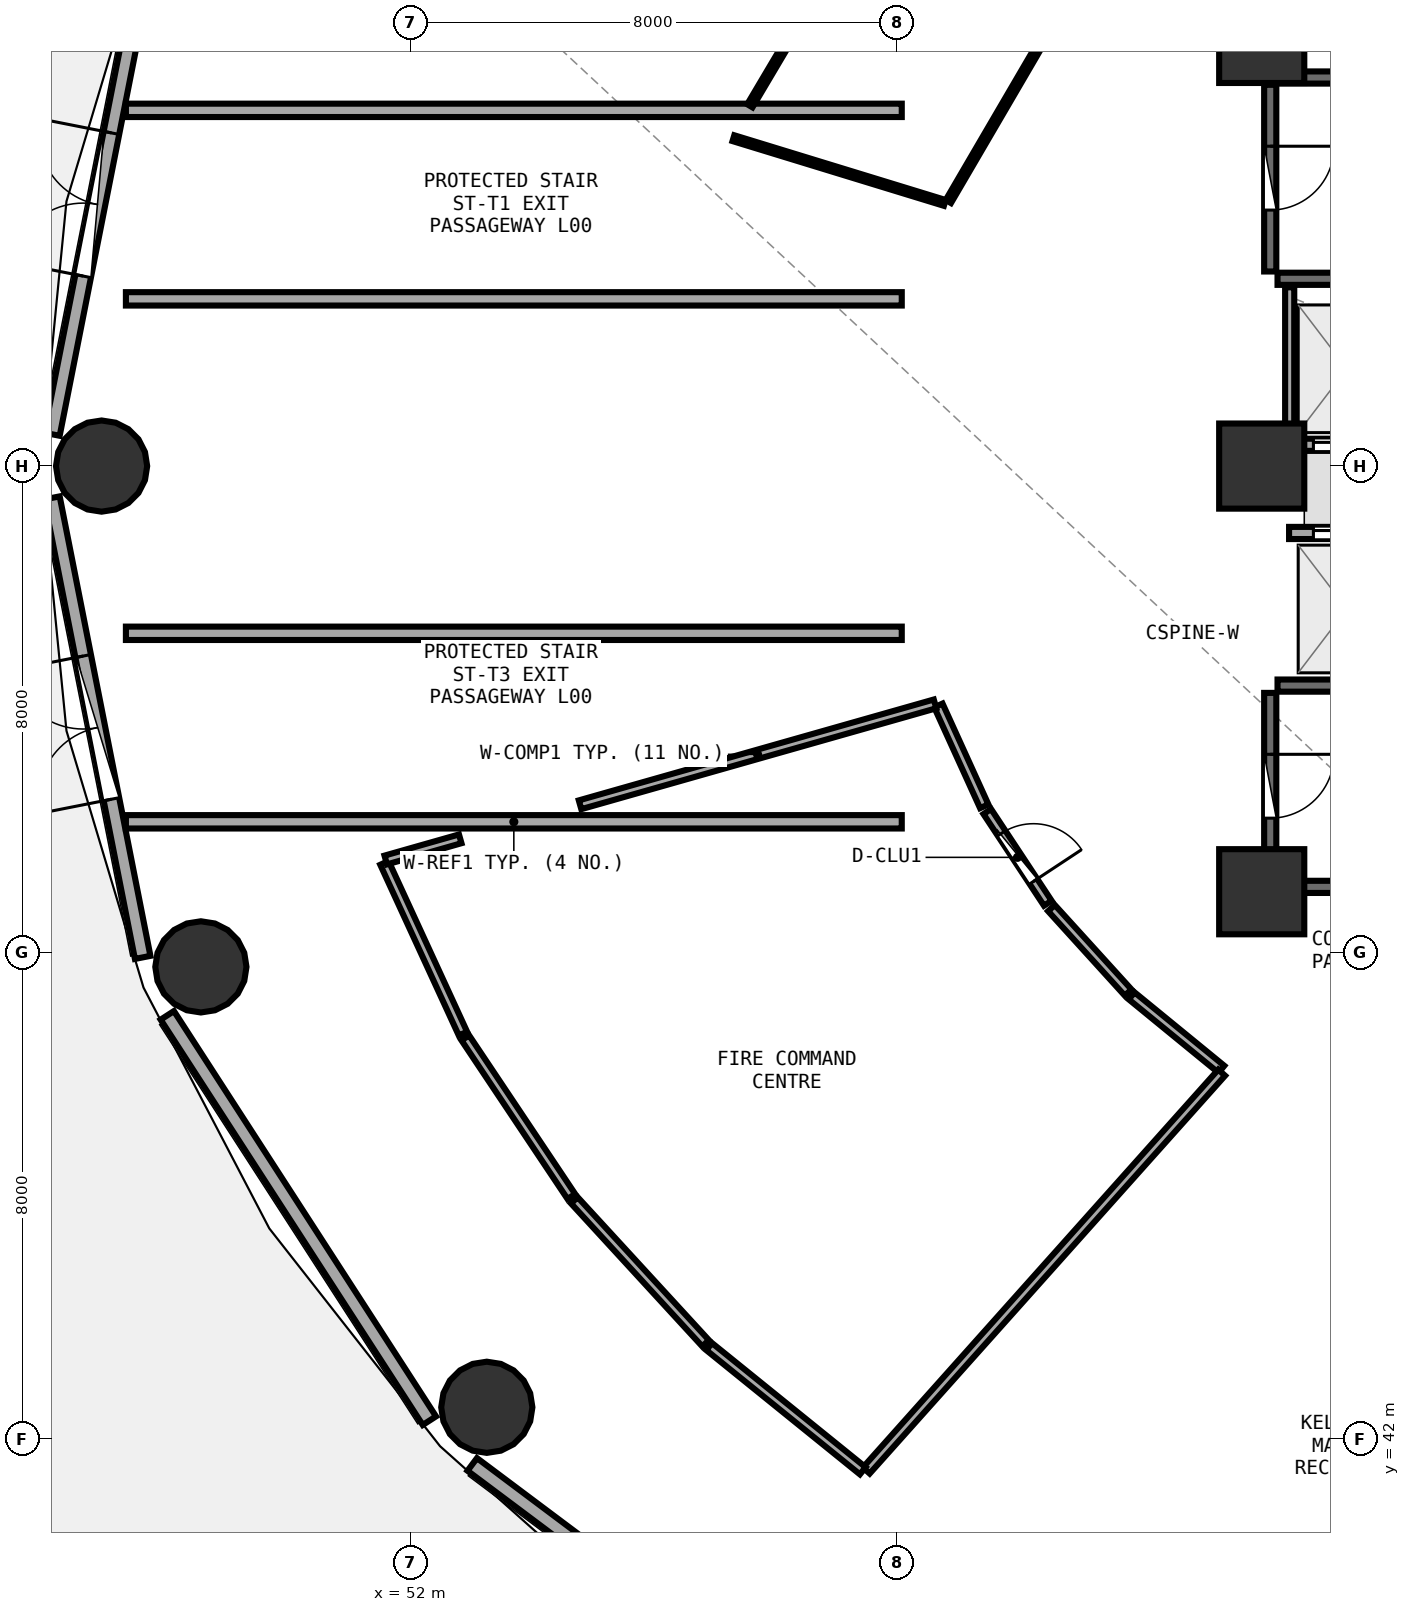
"""IFC4 building model, lengths in metres.
Left out: names, types, materials, properties, quantities, classifications, styles, units other than length and angle.
Written with IfcOpenShell. Run it as: python <this file> out.ifc"""

import sys

from ifc_helpers import new_model, si_unit, direction, frame, frame_2d, origin, origin_2d, place, context, subcontext, project, spatial, rectangle, circle, extrude, element, fill, save


model = new_model("IFC4")
c1 = context("Model", 3, precision=1e-05, world=origin(), true_north=direction((0.0, 1.0)))
c2 = subcontext(c1, "Body", "Model", "MODEL_VIEW")
j1 = project(units=[si_unit("LENGTHUNIT", "METRE"), si_unit("PLANEANGLEUNIT", "RADIAN")], contexts=[c1])
p1 = place(None, origin())
s1 = spatial("IfcSite", under=j1, at=p1, CompositionType="ELEMENT")
p2 = place(p1, origin())
s2 = spatial("IfcBuilding", under=s1, at=p2, CompositionType="ELEMENT")
p3 = place(p2, origin())
s3 = spatial("IfcBuildingStorey", under=s2, at=p3, CompositionType="ELEMENT", Elevation=0.0)
for number, where, z_axis, x_axis in (
    (1, (66.0, 51.0, 0.0), (0.0, 0.0, 1.0), (1.0, 0.0, 0.0)),
    (2, (66.0, 65.0, 0.0), (0.0, 0.0, 1.0), (1.0, 0.0, 0.0)),
    (3, (66.0, 58.0, 0.0), (0.0, 0.0, 1.0), (1.0, 0.0, 0.0)),
):
    element("IfcColumn", number, at=place(p3, frame(where, z_axis=z_axis, x_axis=x_axis)), inside=s3, PredefinedType="PILASTER", context=c2, shape_type="SweptSolid", body=[
        extrude(rectangle(XDim=1.4, YDim=1.4, at=origin_2d()), origin(), (0.0, 0.0, 1.0), 4.5),
    ])
for number, where, z_axis, x_axis in (
    (4, (46.92, 58.0, 0.0), (0.0, 0.0, 1.0), (1.0, 0.0, 0.0)),
    (5, (48.553, 49.764, 0.0), (0.0, 0.0, 1.0), (1.0, 0.0, 0.0)),
    (6, (53.256, 42.522, 0.0), (0.0, 0.0, 1.0), (1.0, 0.0, 0.0)),
):
    element("IfcColumn", number, at=place(p3, frame(where, z_axis=z_axis, x_axis=x_axis)), inside=s3, PredefinedType="COLUMN", context=c2, shape_type="SweptSolid", body=[
        extrude(circle(Radius=0.75, at=origin_2d()), origin(), (0.0, 0.0, 1.0), 4.5),
    ])
p4 = place(p3, frame((47.596, 66.08, 0.0), z_axis=(0.0, 0.0, 1.0), x_axis=(-0.193726159581, -0.98105564322, 0.0)))
e7 = element("IfcWall", 7, at=p4, inside=s3, PredefinedType="SOLIDWALL", context=c2, shape_type="SweptSolid", body=[
    extrude(rectangle(XDim=7.703, YDim=0.26, at=frame_2d((3.851, 0.0))), origin(), (0.0, 0.0, 1.0), 4.185),
])
p5 = place(p4, frame((2.651, 0.0, 0.0)))
e8 = element("IfcOpeningElement", 8, at=p5, cuts=e7, PredefinedType="OPENING", context=c2, shape_type="SweptSolid", body=[
    extrude(rectangle(XDim=2.4, YDim=2.35, at=frame_2d((1.2, 1.175))), frame((0.0, 0.14, 0.0), z_axis=(0.0, -1.0, 0.0), x_axis=(1.0, 0.0, 0.0)), (0.0, 0.0, 1.0), 0.28),
])
p6 = place(p3, frame((46.104, 57.477, 0.0), z_axis=(0.0, 0.0, 1.0), x_axis=(0.193726159581, -0.98105564322, 0.0)))
e9 = element("IfcWall", 9, at=p6, inside=s3, PredefinedType="SOLIDWALL", context=c2, shape_type="SweptSolid", body=[
    extrude(rectangle(XDim=7.703, YDim=0.26, at=frame_2d((3.851, 0.0))), origin(), (0.0, 0.0, 1.0), 4.185),
])
p7 = place(p6, frame((2.651, 0.0, 0.0)))
e10 = element("IfcOpeningElement", 10, at=p7, cuts=e9, PredefinedType="OPENING", context=c2, shape_type="SweptSolid", body=[
    extrude(rectangle(XDim=2.4, YDim=2.35, at=frame_2d((1.2, 1.175))), frame((0.0, 0.14, 0.0), z_axis=(0.0, -1.0, 0.0), x_axis=(1.0, 0.0, 0.0)), (0.0, 0.0, 1.0), 0.28),
])
p8 = place(p3, frame((48.001, 48.967, 0.0), z_axis=(0.0, 0.0, 1.0), x_axis=(0.543005114258, -0.839729388488, 0.0)))
e11 = element("IfcWall", 11, at=p8, inside=s3, PredefinedType="SOLIDWALL", context=c2, shape_type="SweptSolid", body=[
    extrude(rectangle(XDim=7.938, YDim=0.26, at=frame_2d((3.969, 0.0))), origin(), (0.0, 0.0, 1.0), 4.185),
])
p9 = place(p3, frame((53.016, 41.582, 0.0), z_axis=(0.0, 0.0, 1.0), x_axis=(0.80030733173, -0.599590005569, 0.0)))
e12 = element("IfcWall", 12, at=p9, inside=s3, PredefinedType="SOLIDWALL", context=c2, shape_type="SweptSolid", body=[
    extrude(rectangle(XDim=8.291, YDim=0.26, at=frame_2d((4.145, 0.0))), origin(), (0.0, 0.0, 1.0), 4.185),
])
p10 = place(p9, frame((2.945, 0.0, 0.0)))
e13 = element("IfcOpeningElement", 13, at=p10, cuts=e12, PredefinedType="OPENING", context=c2, shape_type="SweptSolid", body=[
    extrude(rectangle(XDim=2.4, YDim=2.35, at=frame_2d((1.2, 1.175))), frame((0.0, 0.14, 0.0), z_axis=(0.0, -1.0, 0.0), x_axis=(1.0, 0.0, 0.0)), (0.0, 0.0, 1.0), 0.28),
])
for number, where, z_axis, x_axis in (
    (14, (66.26, 61.08, 0.0), (0.0, 0.0, 1.0), (1.0, 0.0, 0.0)),
    (15, (73.42, 64.39, 0.0), (0.0, 0.0, 1.0), (-1.0, 0.0, 0.0)),
):
    element("IfcWall", number, at=place(p3, frame(where, z_axis=z_axis, x_axis=x_axis)), inside=s3, PredefinedType="SHEAR", context=c2, shape_type="SweptSolid", body=[
        extrude(rectangle(XDim=7.16, YDim=0.2, at=frame_2d((3.58, 0.0))), origin(), (0.0, 0.0, 1.0), 4.2),
    ])
p11 = place(p3, frame((66.14, 64.27, 0.0), z_axis=(0.0, 0.0, 1.0), x_axis=(0.0, -1.0, 0.0)))
e16 = element("IfcWall", 16, at=p11, inside=s3, PredefinedType="SHEAR", context=c2, shape_type="SweptSolid", body=[
    extrude(rectangle(XDim=3.07, YDim=0.2, at=frame_2d((1.535, 0.0))), origin(), (0.0, 0.0, 1.0), 4.2),
])
p12 = place(p11, frame((1.01, 0.0, 0.0)))
e17 = element("IfcOpeningElement", 17, at=p12, cuts=e16, PredefinedType="OPENING", context=c2, shape_type="SweptSolid", body=[
    extrude(rectangle(XDim=1.05, YDim=2.1, at=frame_2d((0.525, 1.05))), frame((0.0, 0.11, 0.0), z_axis=(0.0, -1.0, 0.0), x_axis=(1.0, 0.0, 0.0)), (0.0, 0.0, 1.0), 0.22),
])
for number, where, z_axis, x_axis in (
    (18, (66.26, 51.08, 0.0), (0.0, 0.0, 1.0), (1.0, 0.0, 0.0)),
    (19, (73.42, 54.39, 0.0), (0.0, 0.0, 1.0), (-1.0, 0.0, 0.0)),
):
    element("IfcWall", number, at=place(p3, frame(where, z_axis=z_axis, x_axis=x_axis)), inside=s3, PredefinedType="SHEAR", context=c2, shape_type="SweptSolid", body=[
        extrude(rectangle(XDim=7.16, YDim=0.2, at=frame_2d((3.58, 0.0))), origin(), (0.0, 0.0, 1.0), 4.2),
    ])
p13 = place(p3, frame((66.14, 54.27, 0.0), z_axis=(0.0, 0.0, 1.0), x_axis=(0.0, -1.0, 0.0)))
e20 = element("IfcWall", 20, at=p13, inside=s3, PredefinedType="SHEAR", context=c2, shape_type="SweptSolid", body=[
    extrude(rectangle(XDim=3.07, YDim=0.2, at=frame_2d((1.535, 0.0))), origin(), (0.0, 0.0, 1.0), 4.2),
])
p14 = place(p13, frame((1.01, 0.0, 0.0)))
e21 = element("IfcOpeningElement", 21, at=p14, cuts=e20, PredefinedType="OPENING", context=c2, shape_type="SweptSolid", body=[
    extrude(rectangle(XDim=1.05, YDim=2.1, at=frame_2d((0.525, 1.05))), frame((0.0, 0.11, 0.0), z_axis=(0.0, -1.0, 0.0), x_axis=(1.0, 0.0, 0.0)), (0.0, 0.0, 1.0), 0.22),
])
for number, where, z_axis, x_axis in (
    (22, (47.32, 63.85, 0.0), (0.0, 0.0, 1.0), (1.0, 0.0, 0.0)),
    (23, (47.32, 60.75, 0.0), (0.0, 0.0, 1.0), (1.0, 0.0, 0.0)),
    (24, (47.32, 55.25, 0.0), (0.0, 0.0, 1.0), (1.0, 0.0, 0.0)),
    (25, (47.32, 52.15, 0.0), (0.0, 0.0, 1.0), (1.0, 0.0, 0.0)),
):
    element("IfcWall", number, at=place(p3, frame(where, z_axis=z_axis, x_axis=x_axis)), inside=s3, PredefinedType="SOLIDWALL", context=c2, shape_type="SweptSolid", body=[
        extrude(rectangle(XDim=12.76, YDim=0.22, at=frame_2d((6.38, 0.0))), origin(), (0.0, 0.0, 1.0), 3.585),
    ])
p15 = place(p3, frame((66.45, 58.35, 0.0), z_axis=(0.0, 0.0, 1.0), x_axis=(1.0, 0.0, 0.0)))
e26 = element("IfcWall", 26, at=p15, inside=s3, PredefinedType="SOLIDWALL", context=c2, shape_type="SweptSolid", body=[
    extrude(rectangle(XDim=6.0, YDim=0.2, at=frame_2d((3.0, 0.0))), origin(), (0.0, 0.0, 1.0), 4.19),
])
p16 = place(p15, frame((0.4, 0.0, 0.0)))
e27 = element("IfcOpeningElement", 27, at=p16, cuts=e26, PredefinedType="OPENING", context=c2, shape_type="SweptSolid", body=[
    extrude(rectangle(XDim=1.1, YDim=2.1, at=frame_2d((0.55, 1.05))), frame((0.0, 0.11, 0.0), z_axis=(0.0, -1.0, 0.0), x_axis=(1.0, 0.0, 0.0)), (0.0, 0.0, 1.0), 0.22),
])
p17 = place(p15, frame((2.4, 0.0, 0.0)))
e28 = element("IfcOpeningElement", 28, at=p17, cuts=e26, PredefinedType="OPENING", context=c2, shape_type="SweptSolid", body=[
    extrude(rectangle(XDim=1.1, YDim=2.1, at=frame_2d((0.55, 1.05))), frame((0.0, 0.11, 0.0), z_axis=(0.0, -1.0, 0.0), x_axis=(1.0, 0.0, 0.0)), (0.0, 0.0, 1.0), 0.22),
])
p18 = place(p15, frame((4.4, 0.0, 0.0)))
e29 = element("IfcOpeningElement", 29, at=p18, cuts=e26, PredefinedType="OPENING", context=c2, shape_type="SweptSolid", body=[
    extrude(rectangle(XDim=1.1, YDim=2.1, at=frame_2d((0.55, 1.05))), frame((0.0, 0.11, 0.0), z_axis=(0.0, -1.0, 0.0), x_axis=(1.0, 0.0, 0.0)), (0.0, 0.0, 1.0), 0.22),
])
p19 = place(p3, frame((66.46, 58.48, 0.0), z_axis=(0.0, 0.0, 1.0), x_axis=(0.0, 1.0, 0.0)))
e30 = element("IfcWall", 30, at=p19, inside=s3, PredefinedType="PARTITIONING", context=c2, shape_type="SweptSolid", body=[
    extrude(rectangle(XDim=2.46, YDim=0.15, at=frame_2d((1.23, 0.0))), origin(), (0.0, 0.0, 1.0), 4.19),
])
p20 = place(p3, frame((66.45, 56.9, 0.0), z_axis=(0.0, 0.0, 1.0), x_axis=(1.0, 0.0, 0.0)))
e31 = element("IfcWall", 31, at=p20, inside=s3, PredefinedType="SOLIDWALL", context=c2, shape_type="SweptSolid", body=[
    extrude(rectangle(XDim=14.4, YDim=0.2, at=frame_2d((7.2, 0.0))), origin(), (0.0, 0.0, 1.0), 4.19),
])
p21 = place(p20, frame((0.4, 0.0, 0.0)))
e32 = element("IfcOpeningElement", 32, at=p21, cuts=e31, PredefinedType="OPENING", context=c2, shape_type="SweptSolid", body=[
    extrude(rectangle(XDim=1.1, YDim=2.1, at=frame_2d((0.55, 1.05))), frame((0.0, 0.11, 0.0), z_axis=(0.0, -1.0, 0.0), x_axis=(1.0, 0.0, 0.0)), (0.0, 0.0, 1.0), 0.22),
])
p22 = place(p20, frame((2.4, 0.0, 0.0)))
e33 = element("IfcOpeningElement", 33, at=p22, cuts=e31, PredefinedType="OPENING", context=c2, shape_type="SweptSolid", body=[
    extrude(rectangle(XDim=1.1, YDim=2.1, at=frame_2d((0.55, 1.05))), frame((0.0, 0.11, 0.0), z_axis=(0.0, -1.0, 0.0), x_axis=(1.0, 0.0, 0.0)), (0.0, 0.0, 1.0), 0.22),
])
p23 = place(p20, frame((4.4, 0.0, 0.0)))
e34 = element("IfcOpeningElement", 34, at=p23, cuts=e31, PredefinedType="OPENING", context=c2, shape_type="SweptSolid", body=[
    extrude(rectangle(XDim=1.1, YDim=2.1, at=frame_2d((0.55, 1.05))), frame((0.0, 0.11, 0.0), z_axis=(0.0, -1.0, 0.0), x_axis=(1.0, 0.0, 0.0)), (0.0, 0.0, 1.0), 0.22),
])
p24 = place(p20, frame((6.4, 0.0, 0.0)))
e35 = element("IfcOpeningElement", 35, at=p24, cuts=e31, PredefinedType="OPENING", context=c2, shape_type="SweptSolid", body=[
    extrude(rectangle(XDim=1.1, YDim=2.1, at=frame_2d((0.55, 1.05))), frame((0.0, 0.11, 0.0), z_axis=(0.0, -1.0, 0.0), x_axis=(1.0, 0.0, 0.0)), (0.0, 0.0, 1.0), 0.22),
])
p25 = place(p20, frame((8.4, 0.0, 0.0)))
e36 = element("IfcOpeningElement", 36, at=p25, cuts=e31, PredefinedType="OPENING", context=c2, shape_type="SweptSolid", body=[
    extrude(rectangle(XDim=1.1, YDim=2.1, at=frame_2d((0.55, 1.05))), frame((0.0, 0.11, 0.0), z_axis=(0.0, -1.0, 0.0), x_axis=(1.0, 0.0, 0.0)), (0.0, 0.0, 1.0), 0.22),
])
p26 = place(p20, frame((10.6, 0.0, 0.0)))
e37 = element("IfcOpeningElement", 37, at=p26, cuts=e31, PredefinedType="OPENING", context=c2, shape_type="SweptSolid", body=[
    extrude(rectangle(XDim=1.1, YDim=2.1, at=frame_2d((0.55, 1.05))), frame((0.0, 0.11, 0.0), z_axis=(0.0, -1.0, 0.0), x_axis=(1.0, 0.0, 0.0)), (0.0, 0.0, 1.0), 0.22),
])
p27 = place(p20, frame((12.8, 0.0, 0.0)))
e38 = element("IfcOpeningElement", 38, at=p27, cuts=e31, PredefinedType="OPENING", context=c2, shape_type="SweptSolid", body=[
    extrude(rectangle(XDim=1.1, YDim=2.1, at=frame_2d((0.55, 1.05))), frame((0.0, 0.11, 0.0), z_axis=(0.0, -1.0, 0.0), x_axis=(1.0, 0.0, 0.0)), (0.0, 0.0, 1.0), 0.22),
])
p28 = place(p3, frame((61.486, 52.319, 0.0), z_axis=(0.0, 0.0, 1.0), x_axis=(0.551109461678, -0.834432957912, 0.0)))
e39 = element("IfcWall", 39, at=p28, inside=s3, PredefinedType="PARTITIONING", context=c2, shape_type="SweptSolid", body=[
    extrude(rectangle(XDim=1.807, YDim=0.15, at=frame_2d((0.903, 0.0))), origin(), (0.0, 0.0, 1.0), 3.585),
])
p29 = place(p28, frame((0.428, 0.0, 0.0)))
e40 = element("IfcOpeningElement", 40, at=p29, cuts=e39, PredefinedType="OPENING", context=c2, shape_type="SweptSolid", body=[
    extrude(rectangle(XDim=0.95, YDim=2.08, at=frame_2d((0.475, 1.04))), frame((0.0, 0.085, 0.0), z_axis=(0.0, -1.0, 0.0), x_axis=(1.0, 0.0, 0.0)), (0.0, 0.0, 1.0), 0.17),
])
p30 = place(p3, frame((62.566, 65.293, 0.0), z_axis=(0.0, 0.0, 1.0), x_axis=(-0.504538896435, -0.863388963321, 0.0)))
e41 = element("IfcWall", 41, at=p30, inside=s3, PredefinedType="PARTITIONING", context=c2, shape_type="SweptSolid", body=[
    extrude(rectangle(XDim=3.408, YDim=0.1, at=frame_2d((1.704, 0.0))), origin(), (0.0, 0.0, 1.0), 3.585),
])
p31 = place(p3, frame((60.788, 62.328, 0.0), z_axis=(0.0, 0.0, 1.0), x_axis=(-0.95616581323, 0.292825780302, 0.0)))
e42 = element("IfcWall", 42, at=p31, inside=s3, PredefinedType="PARTITIONING", context=c2, shape_type="SweptSolid", body=[
    extrude(rectangle(XDim=3.636, YDim=0.1, at=frame_2d((1.818, 0.0))), origin(), (0.0, 0.0, 1.0), 3.945),
])
p32 = place(p3, frame((57.582, 63.925, 0.0), z_axis=(0.0, 0.0, 1.0), x_axis=(0.510042246843, 0.860149351238, 0.0)))
e43 = element("IfcWall", 43, at=p32, inside=s3, PredefinedType="PARTITIONING", context=c2, shape_type="SweptSolid", body=[
    extrude(rectangle(XDim=3.738, YDim=0.1, at=frame_2d((1.869, 0.0))), origin(), (0.0, 0.0, 1.0), 3.585),
])
p33 = place(p3, frame((60.683, 54.064, 0.0), z_axis=(0.0, 0.0, 1.0), x_axis=(0.413772648006, -0.910380247897, 0.0)))
e44 = element("IfcWall", 44, at=p33, inside=s3, PredefinedType="PARTITIONING", context=c2, shape_type="SweptSolid", body=[
    extrude(rectangle(XDim=1.822, YDim=0.15, at=frame_2d((0.911, 0.0))), origin(), (0.0, 0.0, 1.0), 4.19),
])
p34 = place(p3, frame((62.542, 50.731, 0.0), z_axis=(0.0, 0.0, 1.0), x_axis=(0.672186822345, -0.740381574505, 0.0)))
e45 = element("IfcWall", 45, at=p34, inside=s3, PredefinedType="PARTITIONING", context=c2, shape_type="SweptSolid", body=[
    extrude(rectangle(XDim=1.876, YDim=0.15, at=frame_2d((0.938, 0.0))), origin(), (0.0, 0.0, 1.0), 3.585),
])
p35 = place(p3, frame((63.861, 49.288, 0.0), z_axis=(0.0, 0.0, 1.0), x_axis=(0.774014344512, -0.633168061805, 0.0)))
e46 = element("IfcWall", 46, at=p35, inside=s3, PredefinedType="PARTITIONING", context=c2, shape_type="SweptSolid", body=[
    extrude(rectangle(XDim=1.907, YDim=0.15, at=frame_2d((0.953, 0.0))), origin(), (0.0, 0.0, 1.0), 3.585),
])
p36 = place(p3, frame((65.341, 48.025, 0.0), z_axis=(0.0, 0.0, 1.0), x_axis=(-0.666165058958, -0.745804340443, 0.0)))
e47 = element("IfcWall", 47, at=p36, inside=s3, PredefinedType="PARTITIONING", context=c2, shape_type="SweptSolid", body=[
    extrude(rectangle(XDim=8.774, YDim=0.15, at=frame_2d((4.387, 0.0))), origin(), (0.0, 0.0, 1.0), 3.585),
])
p37 = place(p3, frame((59.439, 41.477, 0.0), z_axis=(0.0, 0.0, 1.0), x_axis=(-0.777633153215, 0.628718282715, 0.0)))
e48 = element("IfcWall", 48, at=p37, inside=s3, PredefinedType="PARTITIONING", context=c2, shape_type="SweptSolid", body=[
    extrude(rectangle(XDim=3.25, YDim=0.15, at=frame_2d((1.625, 0.0))), origin(), (0.0, 0.0, 1.0), 3.945),
])
p38 = place(p3, frame((56.854, 43.574, 0.0), z_axis=(0.0, 0.0, 1.0), x_axis=(-0.676368587388, 0.736563326534, 0.0)))
e49 = element("IfcWall", 49, at=p38, inside=s3, PredefinedType="PARTITIONING", context=c2, shape_type="SweptSolid", body=[
    extrude(rectangle(XDim=3.192, YDim=0.15, at=frame_2d((1.596, 0.0))), origin(), (0.0, 0.0, 1.0), 3.585),
])
p39 = place(p3, frame((54.646, 45.988, 0.0), z_axis=(0.0, 0.0, 1.0), x_axis=(-0.555741260271, 0.8313553101, 0.0)))
e50 = element("IfcWall", 50, at=p39, inside=s3, PredefinedType="PARTITIONING", context=c2, shape_type="SweptSolid", body=[
    extrude(rectangle(XDim=3.137, YDim=0.15, at=frame_2d((1.569, 0.0))), origin(), (0.0, 0.0, 1.0), 3.945),
])
p40 = place(p3, frame((52.863, 48.666, 0.0), z_axis=(0.0, 0.0, 1.0), x_axis=(-0.417815646307, 0.908531829768, 0.0)))
e51 = element("IfcWall", 51, at=p40, inside=s3, PredefinedType="PARTITIONING", context=c2, shape_type="SweptSolid", body=[
    extrude(rectangle(XDim=3.091, YDim=0.15, at=frame_2d((1.545, 0.0))), origin(), (0.0, 0.0, 1.0), 3.585),
])
p41 = place(p3, frame((51.594, 51.522, 0.0), z_axis=(0.0, 0.0, 1.0), x_axis=(0.961913594606, 0.273353683919, 0.0)))
e52 = element("IfcWall", 52, at=p41, inside=s3, PredefinedType="PARTITIONING", context=c2, shape_type="SweptSolid", body=[
    extrude(rectangle(XDim=1.274, YDim=0.15, at=frame_2d((0.637, 0.0))), origin(), (0.0, 0.0, 1.0), 3.945),
])
p42 = place(p3, frame((54.789, 52.43, 0.0), z_axis=(0.0, 0.0, 1.0), x_axis=(0.961911562736, 0.273360833836, 0.0)))
e53 = element("IfcWall", 53, at=p42, inside=s3, PredefinedType="PARTITIONING", context=c2, shape_type="SweptSolid", body=[
    extrude(rectangle(XDim=6.07, YDim=0.15, at=frame_2d((3.035, 0.0))), origin(), (0.0, 0.0, 1.0), 3.885),
])
p43 = place(p5, frame((2.4, 0.0, 0.0), z_axis=(0.0, 0.0, 1.0), x_axis=(-1.0, 0.0, 0.0)))
e54 = element("IfcDoor", 54, at=p43, inside=s3, OperationType="DOUBLE_DOOR_SINGLE_SWING", PredefinedType="DOOR", context=c2, shape_type="SweptSolid", body=[
    extrude(rectangle(XDim=2.4, YDim=2.35, at=frame_2d((1.2, 1.175))), frame((0.0, 0.025, 0.0), z_axis=(0.0, -1.0, 0.0), x_axis=(1.0, 0.0, 0.0)), (0.0, 0.0, 1.0), 0.05),
])
fill(e8, e54)
p44 = place(p7, frame((2.4, 0.0, 0.0), z_axis=(0.0, 0.0, 1.0), x_axis=(-1.0, 0.0, 0.0)))
e55 = element("IfcDoor", 55, at=p44, inside=s3, OperationType="DOUBLE_DOOR_SINGLE_SWING", PredefinedType="DOOR", context=c2, shape_type="SweptSolid", body=[
    extrude(rectangle(XDim=2.4, YDim=2.35, at=frame_2d((1.2, 1.175))), frame((0.0, 0.025, 0.0), z_axis=(0.0, -1.0, 0.0), x_axis=(1.0, 0.0, 0.0)), (0.0, 0.0, 1.0), 0.05),
])
fill(e10, e55)
p45 = place(p12, origin())
e56 = element("IfcDoor", 56, at=p45, inside=s3, OperationType="SINGLE_SWING_LEFT", PredefinedType="DOOR", context=c2, shape_type="SweptSolid", body=[
    extrude(rectangle(XDim=1.05, YDim=2.1, at=frame_2d((0.525, 1.05))), frame((0.0, 0.025, 0.0), z_axis=(0.0, -1.0, 0.0), x_axis=(1.0, 0.0, 0.0)), (0.0, 0.0, 1.0), 0.05),
])
fill(e17, e56)
p46 = place(p14, origin())
e57 = element("IfcDoor", 57, at=p46, inside=s3, OperationType="SINGLE_SWING_LEFT", PredefinedType="DOOR", context=c2, shape_type="SweptSolid", body=[
    extrude(rectangle(XDim=1.05, YDim=2.1, at=frame_2d((0.525, 1.05))), frame((0.0, 0.025, 0.0), z_axis=(0.0, -1.0, 0.0), x_axis=(1.0, 0.0, 0.0)), (0.0, 0.0, 1.0), 0.05),
])
fill(e21, e57)
p47 = place(p16, origin())
e58 = element("IfcDoor", 58, at=p47, inside=s3, OperationType="DOUBLE_DOOR_SLIDING", PredefinedType="DOOR", context=c2, shape_type="SweptSolid", body=[
    extrude(rectangle(XDim=1.1, YDim=2.1, at=frame_2d((0.55, 1.05))), frame((0.0, 0.025, 0.0), z_axis=(0.0, -1.0, 0.0), x_axis=(1.0, 0.0, 0.0)), (0.0, 0.0, 1.0), 0.05),
])
fill(e27, e58)
p48 = place(p21, origin())
e59 = element("IfcDoor", 59, at=p48, inside=s3, OperationType="DOUBLE_DOOR_SLIDING", PredefinedType="DOOR", context=c2, shape_type="SweptSolid", body=[
    extrude(rectangle(XDim=1.1, YDim=2.1, at=frame_2d((0.55, 1.05))), frame((0.0, 0.025, 0.0), z_axis=(0.0, -1.0, 0.0), x_axis=(1.0, 0.0, 0.0)), (0.0, 0.0, 1.0), 0.05),
])
fill(e32, e59)
p49 = place(p29, origin())
e60 = element("IfcDoor", 60, at=p49, inside=s3, OperationType="SINGLE_SWING_RIGHT", PredefinedType="DOOR", context=c2, shape_type="SweptSolid", body=[
    extrude(rectangle(XDim=0.95, YDim=2.08, at=frame_2d((0.475, 1.04))), frame((0.0, 0.025, 0.0), z_axis=(0.0, -1.0, 0.0), x_axis=(1.0, 0.0, 0.0)), (0.0, 0.0, 1.0), 0.05),
])
fill(e40, e60)
save(model, sys.argv[1])
